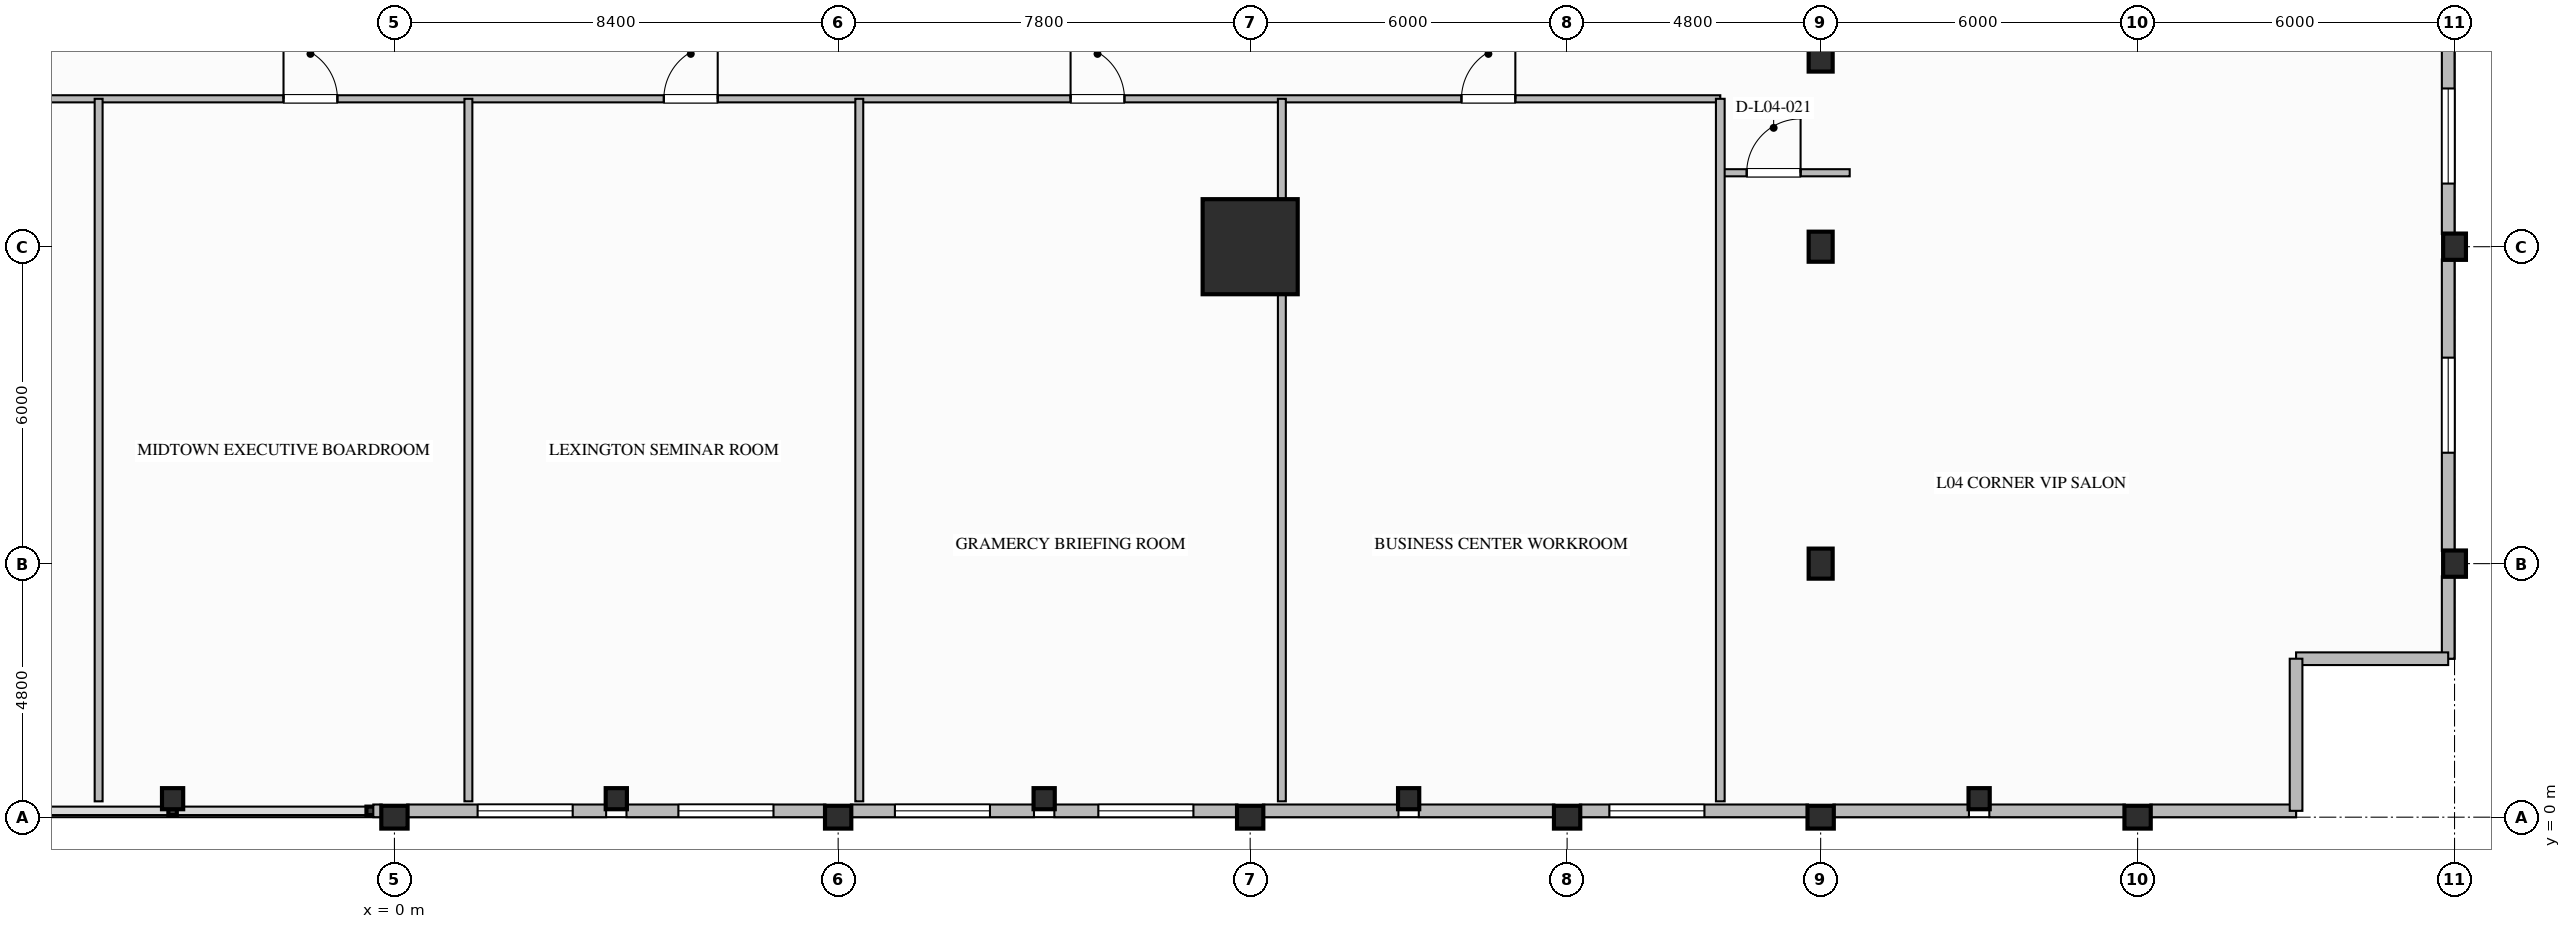
"""IFC4 building model, lengths in metres.
Left out: names, types, materials, properties, quantities, classifications, styles, units other than length and angle.
Written with IfcOpenShell. Run it as: python <this file> out.ifc"""

import sys

from ifc_helpers import new_model, si_unit, direction, frame, frame_2d, origin, origin_2d, place, context, subcontext, project, spatial, rectangle, i_section, extrude, element, fill, save


model = new_model("IFC4")
c1 = context("Model", 3, precision=1e-05, world=origin(), true_north=direction((0.0, 1.0)))
c2 = subcontext(c1, "Body", "Model", "MODEL_VIEW")
j1 = project(units=[si_unit("LENGTHUNIT", "METRE"), si_unit("PLANEANGLEUNIT", "RADIAN")], contexts=[c1])
p1 = place(None, origin())
s1 = spatial("IfcSite", under=j1, at=p1, CompositionType="ELEMENT")
p2 = place(p1, origin())
s2 = spatial("IfcBuilding", under=s1, at=p2, CompositionType="ELEMENT")
p3 = place(p2, frame((0.0, 0.0, 22.4)))
s3 = spatial("IfcBuildingStorey", under=s2, at=p3, CompositionType="ELEMENT", Elevation=22.4)
p4 = place(p3, frame((16.2, 10.8, 0.0), z_axis=(0.0, 0.0, 1.0), x_axis=(1.0, 0.0, 0.0)))
e1 = element("IfcColumn", 1, at=p4, inside=s3, PredefinedType="COLUMN", context=c2, shape_type="SweptSolid", body=[
    extrude(rectangle(XDim=1.8, YDim=1.8, at=origin_2d()), origin(), (0.0, 0.0, 1.0), 5.2),
])
for number, where, z_axis, x_axis in (
    (2, (39.0, 4.8, 0.0), (0.0, 0.0, 1.0), (1.0, 0.0, 0.0)),
    (3, (39.0, 10.8, 0.0), (0.0, 0.0, 1.0), (1.0, 0.0, 0.0)),
    (4, (0.0, 0.0, 0.0), (0.0, 0.0, 1.0), (0.0, 1.0, 0.0)),
    (5, (8.4, 0.0, 0.0), (0.0, 0.0, 1.0), (0.0, 1.0, 0.0)),
    (6, (16.2, 0.0, 0.0), (0.0, 0.0, 1.0), (0.0, 1.0, 0.0)),
    (7, (22.2, 0.0, 0.0), (0.0, 0.0, 1.0), (0.0, 1.0, 0.0)),
    (8, (27.0, 0.0, 0.0), (0.0, 0.0, 1.0), (0.0, 1.0, 0.0)),
    (9, (33.0, 0.0, 0.0), (0.0, 0.0, 1.0), (0.0, 1.0, 0.0)),
):
    element("IfcColumn", number, at=place(p3, frame(where, z_axis=z_axis, x_axis=x_axis)), inside=s3, PredefinedType="COLUMN", context=c2, shape_type="SweptSolid", body=[
        extrude(i_section(OverallWidth=0.432, OverallDepth=0.498, WebThickness=0.056, FlangeThickness=0.089, FilletRadius=0.03, at=origin_2d()), origin(), (0.0, 0.0, 1.0), 5.2),
    ])
for number, where, z_axis, x_axis in (
    (10, (27.0, 4.8, 0.0), (0.0, 0.0, 1.0), (1.0, 0.0, 0.0)),
    (11, (27.0, 10.8, 0.0), (0.0, 0.0, 1.0), (1.0, 0.0, 0.0)),
    (12, (27.0, 14.4, 0.0), (0.0, 0.0, 1.0), (1.0, 0.0, 0.0)),
):
    element("IfcColumn", number, at=place(p3, frame(where, z_axis=z_axis, x_axis=x_axis)), inside=s3, PredefinedType="COLUMN", context=c2, shape_type="SweptSolid", body=[
        extrude(i_section(OverallWidth=0.454, OverallDepth=0.569, WebThickness=0.078, FlangeThickness=0.125, FilletRadius=0.03, at=origin_2d()), origin(), (0.0, 0.0, 1.0), 5.2),
    ])
for number, where, z_axis, x_axis in (
    (13, (-4.2, 0.35, 0.0), (0.0, 0.0, 1.0), (1.0, 0.0, 0.0)),
    (14, (4.2, 0.35, 0.0), (0.0, 0.0, 1.0), (1.0, 0.0, 0.0)),
    (15, (12.3, 0.35, 0.0), (0.0, 0.0, 1.0), (1.0, 0.0, 0.0)),
    (16, (19.2, 0.35, 0.0), (0.0, 0.0, 1.0), (1.0, 0.0, 0.0)),
    (17, (30.0, 0.35, 0.0), (0.0, 0.0, 1.0), (1.0, 0.0, 0.0)),
):
    element("IfcColumn", number, at=place(p3, frame(where, z_axis=z_axis, x_axis=x_axis)), inside=s3, PredefinedType="COLUMN", context=c2, shape_type="SweptSolid", body=[
        extrude(i_section(OverallWidth=0.401, OverallDepth=0.399, WebThickness=0.025, FlangeThickness=0.04, FilletRadius=0.025, at=origin_2d()), origin(), (0.0, 0.0, 1.0), 5.2),
    ])
p5 = place(p3, frame((38.88, 4.559, 0.0), z_axis=(0.0, 0.0, 1.0), x_axis=(0.0, -1.0, 0.0)))
e18 = element("IfcWall", 18, at=p5, inside=s3, PredefinedType="STANDARD", context=c2, shape_type="SweptSolid", body=[
    extrude(rectangle(XDim=1.559, YDim=0.24, at=frame_2d((0.78, 0.0))), origin(), (0.0, 0.0, 1.0), 4.85),
])
p6 = place(p3, frame((38.88, 10.559, 0.0), z_axis=(0.0, 0.0, 1.0), x_axis=(0.0, -1.0, 0.0)))
e19 = element("IfcWall", 19, at=p6, inside=s3, PredefinedType="STANDARD", context=c2, shape_type="SweptSolid", body=[
    extrude(rectangle(XDim=5.518, YDim=0.24, at=frame_2d((2.759, 0.0))), origin(), (0.0, 0.0, 1.0), 4.155),
])
p7 = place(p6, frame((1.859, 0.0, 0.85)))
e20 = element("IfcOpeningElement", 20, at=p7, cuts=e19, PredefinedType="OPENING", context=c2, shape_type="SweptSolid", body=[
    extrude(rectangle(XDim=1.8, YDim=2.2, at=frame_2d((0.9, 1.1))), frame((0.0, 0.13, 0.0), z_axis=(0.0, -1.0, 0.0), x_axis=(1.0, 0.0, 0.0)), (0.0, 0.0, 1.0), 0.26),
])
p8 = place(p3, frame((38.88, 14.75, 0.0), z_axis=(0.0, 0.0, 1.0), x_axis=(0.0, -1.0, 0.0)))
e21 = element("IfcWall", 21, at=p8, inside=s3, PredefinedType="STANDARD", context=c2, shape_type="SweptSolid", body=[
    extrude(rectangle(XDim=3.709, YDim=0.24, at=frame_2d((1.854, 0.0))), origin(), (0.0, 0.0, 1.0), 4.155),
])
p9 = place(p8, frame((0.955, 0.0, 0.85)))
e22 = element("IfcOpeningElement", 22, at=p9, cuts=e21, PredefinedType="OPENING", context=c2, shape_type="SweptSolid", body=[
    extrude(rectangle(XDim=1.8, YDim=2.2, at=frame_2d((0.9, 1.1))), frame((0.0, 0.13, 0.0), z_axis=(0.0, -1.0, 0.0), x_axis=(1.0, 0.0, 0.0)), (0.0, 0.0, 1.0), 0.26),
])
p10 = place(p3, frame((-0.241, 0.12, 0.0), z_axis=(0.0, 0.0, 1.0), x_axis=(-1.0, 0.0, 0.0)))
e23 = element("IfcWall", 23, at=p10, inside=s3, PredefinedType="STANDARD", context=c2, shape_type="SweptSolid", body=[
    extrude(rectangle(XDim=0.159, YDim=0.24, at=frame_2d((0.08, 0.0))), origin(), (0.0, 0.0, 1.0), 4.85),
])
p11 = place(p3, frame((4.007, 0.12, 0.0), z_axis=(0.0, 0.0, 1.0), x_axis=(-1.0, 0.0, 0.0)))
e24 = element("IfcWall", 24, at=p11, inside=s3, PredefinedType="STANDARD", context=c2, shape_type="SweptSolid", body=[
    extrude(rectangle(XDim=3.766, YDim=0.24, at=frame_2d((1.883, 0.0))), origin(), (0.0, 0.0, 1.0), 4.155),
])
p12 = place(p11, frame((0.633, 0.0, 0.65)))
e25 = element("IfcOpeningElement", 25, at=p12, cuts=e24, PredefinedType="OPENING", context=c2, shape_type="SweptSolid", body=[
    extrude(rectangle(XDim=1.8, YDim=2.2, at=frame_2d((0.9, 1.1))), frame((0.0, 0.13, 0.0), z_axis=(0.0, -1.0, 0.0), x_axis=(1.0, 0.0, 0.0)), (0.0, 0.0, 1.0), 0.26),
])
p13 = place(p3, frame((8.159, 0.12, 0.0), z_axis=(0.0, 0.0, 1.0), x_axis=(-1.0, 0.0, 0.0)))
e26 = element("IfcWall", 26, at=p13, inside=s3, PredefinedType="STANDARD", context=c2, shape_type="SweptSolid", body=[
    extrude(rectangle(XDim=3.767, YDim=0.24, at=frame_2d((1.883, 0.0))), origin(), (0.0, 0.0, 1.0), 4.155),
])
p14 = place(p13, frame((0.983, 0.0, 0.65)))
e27 = element("IfcOpeningElement", 27, at=p14, cuts=e26, PredefinedType="OPENING", context=c2, shape_type="SweptSolid", body=[
    extrude(rectangle(XDim=1.8, YDim=2.2, at=frame_2d((0.9, 1.1))), frame((0.0, 0.13, 0.0), z_axis=(0.0, -1.0, 0.0), x_axis=(1.0, 0.0, 0.0)), (0.0, 0.0, 1.0), 0.26),
])
p15 = place(p3, frame((12.107, 0.12, 0.0), z_axis=(0.0, 0.0, 1.0), x_axis=(-1.0, 0.0, 0.0)))
e28 = element("IfcWall", 28, at=p15, inside=s3, PredefinedType="STANDARD", context=c2, shape_type="SweptSolid", body=[
    extrude(rectangle(XDim=3.467, YDim=0.24, at=frame_2d((1.733, 0.0))), origin(), (0.0, 0.0, 1.0), 4.155),
])
p16 = place(p15, frame((0.833, 0.0, 0.65)))
e29 = element("IfcOpeningElement", 29, at=p16, cuts=e28, PredefinedType="OPENING", context=c2, shape_type="SweptSolid", body=[
    extrude(rectangle(XDim=1.8, YDim=2.2, at=frame_2d((0.9, 1.1))), frame((0.0, 0.13, 0.0), z_axis=(0.0, -1.0, 0.0), x_axis=(1.0, 0.0, 0.0)), (0.0, 0.0, 1.0), 0.26),
])
p17 = place(p3, frame((15.959, 0.12, 0.0), z_axis=(0.0, 0.0, 1.0), x_axis=(-1.0, 0.0, 0.0)))
e30 = element("IfcWall", 30, at=p17, inside=s3, PredefinedType="STANDARD", context=c2, shape_type="SweptSolid", body=[
    extrude(rectangle(XDim=3.466, YDim=0.24, at=frame_2d((1.733, 0.0))), origin(), (0.0, 0.0, 1.0), 4.155),
])
p18 = place(p17, frame((0.833, 0.0, 0.65)))
e31 = element("IfcOpeningElement", 31, at=p18, cuts=e30, PredefinedType="OPENING", context=c2, shape_type="SweptSolid", body=[
    extrude(rectangle(XDim=1.8, YDim=2.2, at=frame_2d((0.9, 1.1))), frame((0.0, 0.13, 0.0), z_axis=(0.0, -1.0, 0.0), x_axis=(1.0, 0.0, 0.0)), (0.0, 0.0, 1.0), 0.26),
])
for number, where, z_axis, x_axis in (
    (32, (19.007, 0.12, 0.0), (0.0, 0.0, 1.0), (-1.0, 0.0, 0.0)),
    (33, (21.959, 0.12, 0.0), (0.0, 0.0, 1.0), (-1.0, 0.0, 0.0)),
):
    element("IfcWall", number, at=place(p3, frame(where, z_axis=z_axis, x_axis=x_axis)), inside=s3, PredefinedType="STANDARD", context=c2, shape_type="SweptSolid", body=[
        extrude(rectangle(XDim=2.566, YDim=0.24, at=frame_2d((1.283, 0.0))), origin(), (0.0, 0.0, 1.0), 4.155),
    ])
p19 = place(p3, frame((26.759, 0.12, 0.0), z_axis=(0.0, 0.0, 1.0), x_axis=(-1.0, 0.0, 0.0)))
e34 = element("IfcWall", 34, at=p19, inside=s3, PredefinedType="STANDARD", context=c2, shape_type="SweptSolid", body=[
    extrude(rectangle(XDim=4.318, YDim=0.24, at=frame_2d((2.159, 0.0))), origin(), (0.0, 0.0, 1.0), 4.155),
])
p20 = place(p19, frame((1.959, 0.0, 0.65)))
e35 = element("IfcOpeningElement", 35, at=p20, cuts=e34, PredefinedType="OPENING", context=c2, shape_type="SweptSolid", body=[
    extrude(rectangle(XDim=1.8, YDim=2.2, at=frame_2d((0.9, 1.1))), frame((0.0, 0.13, 0.0), z_axis=(0.0, -1.0, 0.0), x_axis=(1.0, 0.0, 0.0)), (0.0, 0.0, 1.0), 0.26),
])
for number, where, z_axis, x_axis in (
    (36, (29.807, 0.12, 0.0), (0.0, 0.0, 1.0), (-1.0, 0.0, 0.0)),
    (37, (32.759, 0.12, 0.0), (0.0, 0.0, 1.0), (-1.0, 0.0, 0.0)),
):
    element("IfcWall", number, at=place(p3, frame(where, z_axis=z_axis, x_axis=x_axis)), inside=s3, PredefinedType="STANDARD", context=c2, shape_type="SweptSolid", body=[
        extrude(rectangle(XDim=2.566, YDim=0.24, at=frame_2d((1.283, 0.0))), origin(), (0.0, 0.0, 1.0), 4.155),
    ])
p21 = place(p3, frame((36.0, 0.12, 0.0), z_axis=(0.0, 0.0, 1.0), x_axis=(-1.0, 0.0, 0.0)))
e38 = element("IfcWall", 38, at=p21, inside=s3, PredefinedType="STANDARD", context=c2, shape_type="SweptSolid", body=[
    extrude(rectangle(XDim=2.759, YDim=0.24, at=frame_2d((1.379, 0.0))), origin(), (0.0, 0.0, 1.0), 4.85),
])
for number, where, z_axis, x_axis in (
    (39, (38.88, 3.0, 0.0), (0.0, 0.0, 1.0), (-1.0, 0.0, 0.0)),
    (40, (36.0, 3.0, 0.0), (0.0, 0.0, 1.0), (0.0, -1.0, 0.0)),
):
    element("IfcWall", number, at=place(p3, frame(where, z_axis=z_axis, x_axis=x_axis)), inside=s3, PredefinedType="STANDARD", context=c2, shape_type="SweptSolid", body=[
        extrude(rectangle(XDim=2.88, YDim=0.24, at=frame_2d((1.44, 0.0))), origin(), (0.0, 0.0, 1.0), 4.85),
    ])
p22 = place(p3, frame((-21.2, 13.6, 0.0), z_axis=(0.0, 0.0, 1.0), x_axis=(1.0, 0.0, 0.0)))
e41 = element("IfcWall", 41, at=p22, inside=s3, PredefinedType="PARTITIONING", context=c2, shape_type="SweptSolid", body=[
    extrude(rectangle(XDim=46.3, YDim=0.135, at=frame_2d((23.15, 0.0))), origin(), (0.0, 0.0, 1.0), 4.85),
])
p23 = place(p22, frame((9.6, 0.0, 0.0)))
e42 = element("IfcOpeningElement", 42, at=p23, cuts=e41, PredefinedType="OPENING", context=c2, shape_type="SweptSolid", body=[
    extrude(rectangle(XDim=1.02, YDim=2.15, at=frame_2d((0.51, 1.075))), frame((0.0, 0.077, 0.0), z_axis=(0.0, -1.0, 0.0), x_axis=(1.0, 0.0, 0.0)), (0.0, 0.0, 1.0), 0.155),
])
p24 = place(p22, frame((19.1, 0.0, 0.0)))
e43 = element("IfcOpeningElement", 43, at=p24, cuts=e41, PredefinedType="OPENING", context=c2, shape_type="SweptSolid", body=[
    extrude(rectangle(XDim=1.02, YDim=2.15, at=frame_2d((0.51, 1.075))), frame((0.0, 0.077, 0.0), z_axis=(0.0, -1.0, 0.0), x_axis=(1.0, 0.0, 0.0)), (0.0, 0.0, 1.0), 0.155),
])
p25 = place(p22, frame((26.3, 0.0, 0.0)))
e44 = element("IfcOpeningElement", 44, at=p25, cuts=e41, PredefinedType="OPENING", context=c2, shape_type="SweptSolid", body=[
    extrude(rectangle(XDim=1.02, YDim=2.15, at=frame_2d((0.51, 1.075))), frame((0.0, 0.077, 0.0), z_axis=(0.0, -1.0, 0.0), x_axis=(1.0, 0.0, 0.0)), (0.0, 0.0, 1.0), 0.155),
])
p26 = place(p22, frame((34.0, 0.0, 0.0)))
e45 = element("IfcOpeningElement", 45, at=p26, cuts=e41, PredefinedType="OPENING", context=c2, shape_type="SweptSolid", body=[
    extrude(rectangle(XDim=1.02, YDim=2.15, at=frame_2d((0.51, 1.075))), frame((0.0, 0.077, 0.0), z_axis=(0.0, -1.0, 0.0), x_axis=(1.0, 0.0, 0.0)), (0.0, 0.0, 1.0), 0.155),
])
p27 = place(p22, frame((41.4, 0.0, 0.0)))
e46 = element("IfcOpeningElement", 46, at=p27, cuts=e41, PredefinedType="OPENING", context=c2, shape_type="SweptSolid", body=[
    extrude(rectangle(XDim=1.02, YDim=2.15, at=frame_2d((0.51, 1.075))), frame((0.0, 0.077, 0.0), z_axis=(0.0, -1.0, 0.0), x_axis=(1.0, 0.0, 0.0)), (0.0, 0.0, 1.0), 0.155),
])
p28 = place(p3, frame((25.1, 12.2, 0.0), z_axis=(0.0, 0.0, 1.0), x_axis=(1.0, 0.0, 0.0)))
e47 = element("IfcWall", 47, at=p28, inside=s3, PredefinedType="PARTITIONING", context=c2, shape_type="SweptSolid", body=[
    extrude(rectangle(XDim=2.45, YDim=0.135, at=frame_2d((1.225, 0.0))), origin(), (0.0, 0.0, 1.0), 4.85),
])
p29 = place(p28, frame((0.5, 0.0, 0.0)))
e48 = element("IfcOpeningElement", 48, at=p29, cuts=e47, PredefinedType="OPENING", context=c2, shape_type="SweptSolid", body=[
    extrude(rectangle(XDim=1.02, YDim=2.15, at=frame_2d((0.51, 1.075))), frame((0.0, 0.077, 0.0), z_axis=(0.0, -1.0, 0.0), x_axis=(1.0, 0.0, 0.0)), (0.0, 0.0, 1.0), 0.155),
])
p30 = place(p3, frame((25.1, 0.3, 0.0), z_axis=(0.0, 0.0, 1.0), x_axis=(0.0, 1.0, 0.0)))
e49 = element("IfcWall", 49, at=p30, inside=s3, PredefinedType="PARTITIONING", context=c2, shape_type="SweptSolid", body=[
    extrude(rectangle(XDim=13.3, YDim=0.165, at=frame_2d((6.65, 0.0))), origin(), (0.0, 0.0, 1.0), 4.85),
])
for number, where, z_axis, x_axis in (
    (50, (-5.6, 0.3, 0.0), (0.0, 0.0, 1.0), (0.0, 1.0, 0.0)),
    (51, (1.4, 0.3, 0.0), (0.0, 0.0, 1.0), (0.0, 1.0, 0.0)),
    (52, (8.8, 0.3, 0.0), (0.0, 0.0, 1.0), (0.0, 1.0, 0.0)),
    (53, (16.8, 0.3, 0.0), (0.0, 0.0, 1.0), (0.0, 1.0, 0.0)),
):
    element("IfcWall", number, at=place(p3, frame(where, z_axis=z_axis, x_axis=x_axis)), inside=s3, PredefinedType="PARTITIONING", context=c2, shape_type="SweptSolid", body=[
        extrude(rectangle(XDim=13.3, YDim=0.15, at=frame_2d((6.65, 0.0))), origin(), (0.0, 0.0, 1.0), 4.85),
    ])
p31 = place(p7, origin())
e54 = element("IfcWindow", 54, at=p31, inside=s3, PartitioningType="SINGLE_PANEL", PredefinedType="WINDOW", context=c2, shape_type="SweptSolid", body=[
    extrude(rectangle(XDim=1.8, YDim=2.2, at=frame_2d((0.9, 1.1))), frame((0.0, 0.03, 0.0), z_axis=(0.0, -1.0, 0.0), x_axis=(1.0, 0.0, 0.0)), (0.0, 0.0, 1.0), 0.06),
])
fill(e20, e54)
p32 = place(p9, origin())
e55 = element("IfcWindow", 55, at=p32, inside=s3, PartitioningType="SINGLE_PANEL", PredefinedType="WINDOW", context=c2, shape_type="SweptSolid", body=[
    extrude(rectangle(XDim=1.8, YDim=2.2, at=frame_2d((0.9, 1.1))), frame((0.0, 0.03, 0.0), z_axis=(0.0, -1.0, 0.0), x_axis=(1.0, 0.0, 0.0)), (0.0, 0.0, 1.0), 0.06),
])
fill(e22, e55)
p33 = place(p12, origin())
e56 = element("IfcWindow", 56, at=p33, inside=s3, PartitioningType="SINGLE_PANEL", PredefinedType="WINDOW", context=c2, shape_type="SweptSolid", body=[
    extrude(rectangle(XDim=1.8, YDim=2.2, at=frame_2d((0.9, 1.1))), frame((0.0, 0.03, 0.0), z_axis=(0.0, -1.0, 0.0), x_axis=(1.0, 0.0, 0.0)), (0.0, 0.0, 1.0), 0.06),
])
fill(e25, e56)
p34 = place(p14, origin())
e57 = element("IfcWindow", 57, at=p34, inside=s3, PartitioningType="SINGLE_PANEL", PredefinedType="WINDOW", context=c2, shape_type="SweptSolid", body=[
    extrude(rectangle(XDim=1.8, YDim=2.2, at=frame_2d((0.9, 1.1))), frame((0.0, 0.03, 0.0), z_axis=(0.0, -1.0, 0.0), x_axis=(1.0, 0.0, 0.0)), (0.0, 0.0, 1.0), 0.06),
])
fill(e27, e57)
p35 = place(p16, origin())
e58 = element("IfcWindow", 58, at=p35, inside=s3, PartitioningType="SINGLE_PANEL", PredefinedType="WINDOW", context=c2, shape_type="SweptSolid", body=[
    extrude(rectangle(XDim=1.8, YDim=2.2, at=frame_2d((0.9, 1.1))), frame((0.0, 0.03, 0.0), z_axis=(0.0, -1.0, 0.0), x_axis=(1.0, 0.0, 0.0)), (0.0, 0.0, 1.0), 0.06),
])
fill(e29, e58)
p36 = place(p18, origin())
e59 = element("IfcWindow", 59, at=p36, inside=s3, PartitioningType="SINGLE_PANEL", PredefinedType="WINDOW", context=c2, shape_type="SweptSolid", body=[
    extrude(rectangle(XDim=1.8, YDim=2.2, at=frame_2d((0.9, 1.1))), frame((0.0, 0.03, 0.0), z_axis=(0.0, -1.0, 0.0), x_axis=(1.0, 0.0, 0.0)), (0.0, 0.0, 1.0), 0.06),
])
fill(e31, e59)
p37 = place(p20, origin())
e60 = element("IfcWindow", 60, at=p37, inside=s3, PartitioningType="SINGLE_PANEL", PredefinedType="WINDOW", context=c2, shape_type="SweptSolid", body=[
    extrude(rectangle(XDim=1.8, YDim=2.2, at=frame_2d((0.9, 1.1))), frame((0.0, 0.03, 0.0), z_axis=(0.0, -1.0, 0.0), x_axis=(1.0, 0.0, 0.0)), (0.0, 0.0, 1.0), 0.06),
])
fill(e35, e60)
p38 = place(p29, origin())
e61 = element("IfcDoor", 61, at=p38, inside=s3, OperationType="SINGLE_SWING_RIGHT", PredefinedType="DOOR", context=c2, shape_type="SweptSolid", body=[
    extrude(rectangle(XDim=1.02, YDim=2.15, at=frame_2d((0.51, 1.075))), frame((0.0, 0.025, 0.0), z_axis=(0.0, -1.0, 0.0), x_axis=(1.0, 0.0, 0.0)), (0.0, 0.0, 1.0), 0.05),
])
fill(e48, e61)
p39 = place(p24, origin())
e62 = element("IfcDoor", 62, at=p39, inside=s3, OperationType="SINGLE_SWING_LEFT", PredefinedType="DOOR", context=c2, shape_type="SweptSolid", body=[
    extrude(rectangle(XDim=1.02, YDim=2.15, at=frame_2d((0.51, 1.075))), frame((0.0, 0.025, 0.0), z_axis=(0.0, -1.0, 0.0), x_axis=(1.0, 0.0, 0.0)), (0.0, 0.0, 1.0), 0.05),
])
fill(e43, e62)
p40 = place(p25, origin())
e63 = element("IfcDoor", 63, at=p40, inside=s3, OperationType="SINGLE_SWING_RIGHT", PredefinedType="DOOR", context=c2, shape_type="SweptSolid", body=[
    extrude(rectangle(XDim=1.02, YDim=2.15, at=frame_2d((0.51, 1.075))), frame((0.0, 0.025, 0.0), z_axis=(0.0, -1.0, 0.0), x_axis=(1.0, 0.0, 0.0)), (0.0, 0.0, 1.0), 0.05),
])
fill(e44, e63)
p41 = place(p26, origin())
e64 = element("IfcDoor", 64, at=p41, inside=s3, OperationType="SINGLE_SWING_LEFT", PredefinedType="DOOR", context=c2, shape_type="SweptSolid", body=[
    extrude(rectangle(XDim=1.02, YDim=2.15, at=frame_2d((0.51, 1.075))), frame((0.0, 0.025, 0.0), z_axis=(0.0, -1.0, 0.0), x_axis=(1.0, 0.0, 0.0)), (0.0, 0.0, 1.0), 0.05),
])
fill(e45, e64)
p42 = place(p27, origin())
e65 = element("IfcDoor", 65, at=p42, inside=s3, OperationType="SINGLE_SWING_RIGHT", PredefinedType="DOOR", context=c2, shape_type="SweptSolid", body=[
    extrude(rectangle(XDim=1.02, YDim=2.15, at=frame_2d((0.51, 1.075))), frame((0.0, 0.025, 0.0), z_axis=(0.0, -1.0, 0.0), x_axis=(1.0, 0.0, 0.0)), (0.0, 0.0, 1.0), 0.05),
])
fill(e46, e65)
save(model, sys.argv[1])
